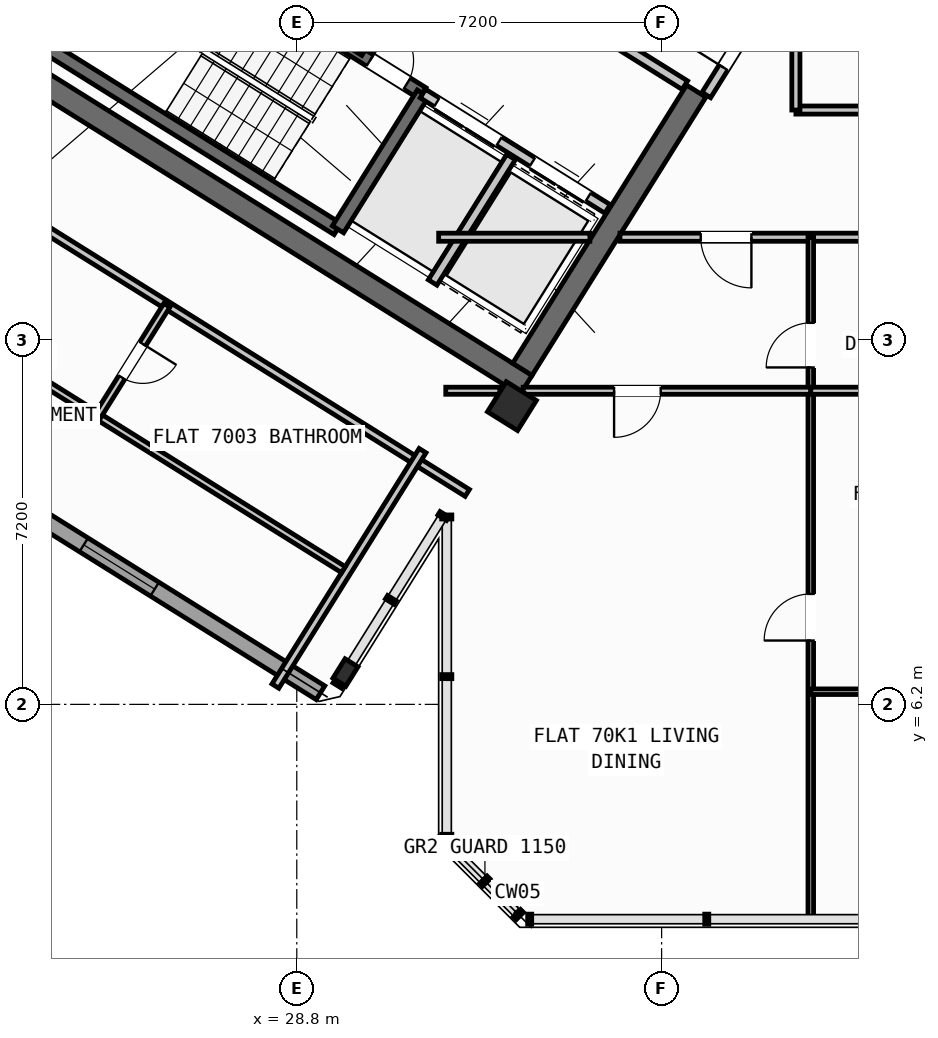
"""IFC4 building model, lengths in metres.
Left out: names, types, materials, properties, quantities, classifications, styles, units other than length and angle.
Written with IfcOpenShell. Run it as: python <this file> out.ifc"""

import sys

from ifc_helpers import new_model, si_unit, direction, frame, frame_2d, origin, origin_2d, place, context, subcontext, project, spatial, rectangle, hollow_rectangle, i_section, extrude, source, transform, mapped, element, fill, save


model = new_model("IFC4")
c1 = context("Model", 3, precision=1e-05, world=origin(), true_north=direction((0.0, 1.0)))
c2 = subcontext(c1, "Body", "Model", "MODEL_VIEW")
j1 = project(units=[si_unit("LENGTHUNIT", "METRE"), si_unit("PLANEANGLEUNIT", "RADIAN")], contexts=[c1])
p1 = place(None, origin())
s1 = spatial("IfcSite", under=j1, at=p1, CompositionType="ELEMENT")
p2 = place(p1, origin())
s2 = spatial("IfcBuilding", under=s1, at=p2, CompositionType="ELEMENT")
p3 = place(p2, frame((0.0, 0.0, 277.2)))
s3 = spatial("IfcBuildingStorey", under=s2, at=p3, CompositionType="ELEMENT", Elevation=277.2)
p4 = place(p3, frame((33.324, 12.503, 0.0), z_axis=(0.0, 0.0, 1.0), x_axis=(-0.848043529849, 0.529926571782, 0.0)))
e1 = element("IfcWall", 1, at=p4, inside=s3, PredefinedType="SHEAR", context=c2, shape_type="SweptSolid", body=[
    extrude(rectangle(XDim=13.04, YDim=0.45, at=frame_2d((6.52, 0.0))), origin(), (0.0, 0.0, 1.0), 3.35),
])
p5 = place(p3, frame((36.683, 18.304, 0.0), z_axis=(0.0, 0.0, 1.0), x_axis=(-0.529904039071, -0.848057609704, 0.0)))
e2 = element("IfcWall", 2, at=p5, inside=s3, PredefinedType="SHEAR", context=c2, shape_type="SweptSolid", body=[
    extrude(rectangle(XDim=6.475, YDim=0.45, at=frame_2d((3.238, 0.0))), origin(), (0.0, 0.0, 1.0), 3.35),
])
m1 = source(origin(), c2, "Body", "SweptSolid", [
    extrude(hollow_rectangle(XDim=0.7, YDim=0.7, WallThickness=0.028, at=origin_2d()), origin(), (0.0, 0.0, 1.0), 3.6),
])
p6 = place(p3, frame((33.046, 12.087, 0.0), z_axis=(0.0, 0.0, 1.0), x_axis=(-0.848048096156, 0.529919264233, 0.0)))
e3 = element("IfcColumn", 3, at=p6, inside=s3, PredefinedType="COLUMN", context=c2, shape_type="MappedRepresentation", body=[
    mapped(m1, transform((0.0, 0.0, 0.0), scale=1.0)),
])
m2 = source(origin(), c2, "Body", "SweptSolid", [
    extrude(i_section(OverallWidth=0.3, OverallDepth=0.45, WebThickness=0.014, FlangeThickness=0.026, at=origin_2d()), origin(), (0.0, 0.0, 1.0), 3.6),
])
p7 = place(p3, frame((29.761, 6.829, 0.0), z_axis=(0.0, 0.0, 1.0), x_axis=(-0.848048096156, 0.529919264233, 0.0)))
e4 = element("IfcColumn", 4, at=p7, inside=s3, PredefinedType="COLUMN", context=c2, shape_type="MappedRepresentation", body=[
    mapped(m2, transform((0.0, 0.0, 0.0), scale=1.0)),
])
p8 = place(p3, frame((29.268, 6.429, 0.0), z_axis=(0.0, 0.0, 1.0), x_axis=(-0.848049971435, 0.529916263149, 0.0)))
e5 = element("IfcWall", 5, at=p8, inside=s3, PredefinedType="STANDARD", context=c2, shape_type="SweptSolid", body=[
    extrude(rectangle(XDim=31.588, YDim=0.32, at=frame_2d((15.794, 0.0))), origin(), (0.0, 0.0, 1.0), 3.35),
])
p9 = place(p8, frame((16.362, 0.0, 0.0)))
e6 = element("IfcOpeningElement", 6, at=p9, cuts=e5, PredefinedType="OPENING", context=c2, shape_type="SweptSolid", body=[
    extrude(rectangle(XDim=1.2, YDim=2.15, at=frame_2d((0.6, 1.075))), frame((0.0, 0.17, 0.0), z_axis=(0.0, -1.0, 0.0), x_axis=(1.0, 0.0, 0.0)), (0.0, 0.0, 1.0), 0.34),
])
p10 = place(p8, frame((3.859, 0.0, 0.9)))
e7 = element("IfcOpeningElement", 7, at=p10, cuts=e5, PredefinedType="OPENING", context=c2, shape_type="SweptSolid", body=[
    extrude(rectangle(XDim=1.65, YDim=1.45, at=frame_2d((0.825, 0.725))), frame((0.0, 0.17, 0.0), z_axis=(0.0, -1.0, 0.0), x_axis=(1.0, 0.0, 0.0)), (0.0, 0.0, 1.0), 0.34),
])
p11 = place(p8, frame((10.519, 0.0, 0.9)))
e8 = element("IfcOpeningElement", 8, at=p11, cuts=e5, PredefinedType="OPENING", context=c2, shape_type="SweptSolid", body=[
    extrude(rectangle(XDim=1.65, YDim=1.45, at=frame_2d((0.825, 0.725))), frame((0.0, 0.17, 0.0), z_axis=(0.0, -1.0, 0.0), x_axis=(1.0, 0.0, 0.0)), (0.0, 0.0, 1.0), 0.34),
])
p12 = place(p8, frame((20.015, 0.0, 0.95)))
e9 = element("IfcOpeningElement", 9, at=p12, cuts=e5, PredefinedType="OPENING", context=c2, shape_type="SweptSolid", body=[
    extrude(rectangle(XDim=1.95, YDim=1.35, at=frame_2d((0.975, 0.675))), frame((0.0, 0.17, 0.0), z_axis=(0.0, -1.0, 0.0), x_axis=(1.0, 0.0, 0.0)), (0.0, 0.0, 1.0), 0.34),
])
p13 = place(p8, frame((23.715, 0.0, 1.0)))
e10 = element("IfcOpeningElement", 10, at=p13, cuts=e5, PredefinedType="OPENING", context=c2, shape_type="SweptSolid", body=[
    extrude(rectangle(XDim=0.9, YDim=1.25, at=frame_2d((0.45, 0.625))), frame((0.0, 0.17, 0.0), z_axis=(0.0, -1.0, 0.0), x_axis=(1.0, 0.0, 0.0)), (0.0, 0.0, 1.0), 0.34),
])
p14 = place(p8, frame((27.706, 0.0, 0.9)))
e11 = element("IfcOpeningElement", 11, at=p14, cuts=e5, PredefinedType="OPENING", context=c2, shape_type="SweptSolid", body=[
    extrude(rectangle(XDim=1.65, YDim=1.45, at=frame_2d((0.825, 0.725))), frame((0.0, 0.17, 0.0), z_axis=(0.0, -1.0, 0.0), x_axis=(1.0, 0.0, 0.0)), (0.0, 0.0, 1.0), 0.34),
])
p15 = place(p3, frame((29.605, 15.581, 0.0), z_axis=(0.0, 0.0, 1.0), x_axis=(-0.848036911448, 0.529937163087, 0.0)))
e12 = element("IfcWall", 12, at=p15, inside=s3, PredefinedType="SHEAR", context=c2, shape_type="SweptSolid", body=[
    extrude(rectangle(XDim=7.46, YDim=0.26, at=frame_2d((3.73, 0.0))), origin(), (0.0, 0.0, 1.0), 3.35),
])
p16 = place(p3, frame((31.28, 18.261, 0.0), z_axis=(0.0, 0.0, 1.0), x_axis=(-0.848051618787, 0.529913626805, 0.0)))
e13 = element("IfcWall", 13, at=p16, inside=s3, PredefinedType="SHEAR", context=c2, shape_type="SweptSolid", body=[
    extrude(rectangle(XDim=7.46, YDim=0.26, at=frame_2d((3.73, 0.0))), origin(), (0.0, 0.0, 1.0), 3.35),
])
p17 = place(p16, frame((0.36, 0.0, 0.0)))
e14 = element("IfcOpeningElement", 14, at=p17, cuts=e13, PredefinedType="OPENING", context=c2, shape_type="SweptSolid", body=[
    extrude(rectangle(XDim=0.86, YDim=2.05, at=frame_2d((0.43, 1.025))), frame((0.0, 0.14, 0.0), z_axis=(0.0, -1.0, 0.0), x_axis=(1.0, 0.0, 0.0)), (0.0, 0.0, 1.0), 0.28),
])
p18 = place(p3, frame((31.288, 18.256, 0.0), z_axis=(0.0, 0.0, 1.0), x_axis=(-0.529943379326, -0.848033026897, 0.0)))
e15 = element("IfcWall", 15, at=p18, inside=s3, PredefinedType="SHEAR", context=c2, shape_type="SweptSolid", body=[
    extrude(rectangle(XDim=3.16, YDim=0.26, at=frame_2d((1.58, 0.0))), origin(), (0.0, 0.0, 1.0), 3.35),
])
p19 = place(p3, frame((34.933, 15.978, 0.0), z_axis=(0.0, 0.0, 1.0), x_axis=(-0.848055739377, 0.529907032327, 0.0)))
e16 = element("IfcWall", 16, at=p19, inside=s3, PredefinedType="STANDARD", context=c2, shape_type="SweptSolid", body=[
    extrude(rectangle(XDim=4.298, YDim=0.2, at=frame_2d((2.149, 0.0))), origin(), (0.0, 0.0, 1.0), 3.34),
])
p20 = place(p19, frame((0.448, 0.0, 0.0)))
e17 = element("IfcOpeningElement", 17, at=p20, cuts=e16, PredefinedType="OPENING", context=c2, shape_type="SweptSolid", body=[
    extrude(rectangle(XDim=1.3, YDim=2.2, at=frame_2d((0.65, 1.1))), frame((0.0, 0.11, 0.0), z_axis=(0.0, -1.0, 0.0), x_axis=(1.0, 0.0, 0.0)), (0.0, 0.0, 1.0), 0.22),
])
p21 = place(p19, frame((2.523, 0.0, 0.0)))
e18 = element("IfcOpeningElement", 18, at=p21, cuts=e16, PredefinedType="OPENING", context=c2, shape_type="SweptSolid", body=[
    extrude(rectangle(XDim=1.45, YDim=2.25, at=frame_2d((0.725, 1.125))), frame((0.0, 0.11, 0.0), z_axis=(0.0, -1.0, 0.0), x_axis=(1.0, 0.0, 0.0)), (0.0, 0.0, 1.0), 0.22),
])
p22 = place(p3, frame((36.459, 18.421, 0.0), z_axis=(0.0, 0.0, 1.0), x_axis=(-0.848059591691, 0.529900867089, 0.0)))
e19 = element("IfcWall", 19, at=p22, inside=s3, PredefinedType="STANDARD", context=c2, shape_type="SweptSolid", body=[
    extrude(rectangle(XDim=5.818, YDim=0.2, at=frame_2d((2.909, 0.0))), origin(), (0.0, 0.0, 1.0), 3.34),
])
p23 = place(p22, frame((2.598, 0.0, 0.0)))
e20 = element("IfcOpeningElement", 20, at=p23, cuts=e19, PredefinedType="OPENING", context=c2, shape_type="SweptSolid", body=[
    extrude(rectangle(XDim=1.15, YDim=2.1, at=frame_2d((0.575, 1.05))), frame((0.0, 0.11, 0.0), z_axis=(0.0, -1.0, 0.0), x_axis=(1.0, 0.0, 0.0)), (0.0, 0.0, 1.0), 0.22),
])
p24 = place(p3, frame((33.029, 17.003, 0.0), z_axis=(0.0, 0.0, 1.0), x_axis=(-0.529916267533, -0.848049968695, 0.0)))
e21 = element("IfcWall", 21, at=p24, inside=s3, PredefinedType="STANDARD", context=c2, shape_type="SweptSolid", body=[
    extrude(rectangle(XDim=2.92, YDim=0.2, at=frame_2d((1.46, 0.0))), origin(), (0.0, 0.0, 1.0), 3.34),
])
p25 = place(p3, frame((31.525, 21.504, 0.0), z_axis=(0.0, 0.0, 1.0), x_axis=(-0.529907497854, -0.848055448493, 0.0)))
e22 = element("IfcWall", 22, at=p25, inside=s3, PredefinedType="STANDARD", context=c2, shape_type="SweptSolid", body=[
    extrude(rectangle(XDim=2.88, YDim=0.2, at=frame_2d((1.44, 0.0))), origin(), (0.0, 0.0, 1.0), 3.34),
])
p26 = place(p3, frame((24.588, 27.631, 0.0), z_axis=(0.0, 0.0, 1.0), x_axis=(-0.529914586043, -0.848051019396, 0.0)))
e23 = element("IfcWall", 23, at=p26, inside=s3, PredefinedType="PARTITIONING", context=c2, shape_type="SweptSolid", body=[
    extrude(rectangle(XDim=15.35, YDim=0.16, at=frame_2d((7.675, 0.0))), origin(), (0.0, 0.0, 1.0), 3.34),
])
p27 = place(p3, frame((32.164, 10.374, 0.0), z_axis=(0.0, 0.0, 1.0), x_axis=(-0.848044107957, 0.529925646633, 0.0)))
e24 = element("IfcWall", 24, at=p27, inside=s3, PredefinedType="PARTITIONING", context=c2, shape_type="SweptSolid", body=[
    extrude(rectangle(XDim=15.57, YDim=0.16, at=frame_2d((7.785, 0.0))), origin(), (0.0, 0.0, 1.0), 3.34),
])
p28 = place(p27, frame((10.83, 0.0, 0.0)))
e25 = element("IfcOpeningElement", 25, at=p28, cuts=e24, PredefinedType="OPENING", context=c2, shape_type="SweptSolid", body=[
    extrude(rectangle(XDim=1.0, YDim=2.1, at=frame_2d((0.5, 1.05))), frame((0.0, 0.09, 0.0), z_axis=(0.0, -1.0, 0.0), x_axis=(1.0, 0.0, 0.0)), (0.0, 0.0, 1.0), 0.18),
])
p29 = place(p3, frame((31.282, 11.208, 0.0), z_axis=(0.0, 0.0, 1.0), x_axis=(-0.529938869374, -0.84803584519, 0.0)))
e26 = element("IfcWall", 26, at=p29, inside=s3, PredefinedType="PARTITIONING", context=c2, shape_type="SweptSolid", body=[
    extrude(rectangle(XDim=5.48, YDim=0.16, at=frame_2d((2.74, 0.0))), origin(), (0.0, 0.0, 1.0), 3.34),
])
p30 = place(p3, frame((29.72, 8.859, 0.0), z_axis=(0.0, 0.0, 1.0), x_axis=(-0.848049134363, 0.529917602752, 0.0)))
e27 = element("IfcWall", 27, at=p30, inside=s3, PredefinedType="PLUMBINGWALL", context=c2, shape_type="SweptSolid", body=[
    extrude(rectangle(XDim=14.3, YDim=0.14, at=frame_2d((7.15, 0.0))), origin(), (0.0, 0.0, 1.0), 3.34),
])
p31 = place(p30, frame((9.57, 0.0, 0.0)))
e28 = element("IfcOpeningElement", 28, at=p31, cuts=e27, PredefinedType="OPENING", context=c2, shape_type="SweptSolid", body=[
    extrude(rectangle(XDim=0.92, YDim=2.08, at=frame_2d((0.46, 1.04))), frame((0.0, 0.08, 0.0), z_axis=(0.0, -1.0, 0.0), x_axis=(1.0, 0.0, 0.0)), (0.0, 0.0, 1.0), 0.16),
])
p32 = place(p3, frame((26.237, 14.078, 0.0), z_axis=(0.0, 0.0, 1.0), x_axis=(-0.52995640672, -0.848024885824, 0.0)))
e29 = element("IfcWall", 29, at=p32, inside=s3, PredefinedType="PLUMBINGWALL", context=c2, shape_type="SweptSolid", body=[
    extrude(rectangle(XDim=2.58, YDim=0.14, at=frame_2d((1.29, 0.0))), origin(), (0.0, 0.0, 1.0), 3.34),
])
p33 = place(p32, frame((0.9, 0.0, 0.0)))
e30 = element("IfcOpeningElement", 30, at=p33, cuts=e29, PredefinedType="OPENING", context=c2, shape_type="SweptSolid", body=[
    extrude(rectangle(XDim=0.78, YDim=2.05, at=frame_2d((0.39, 1.025))), frame((0.0, 0.08, 0.0), z_axis=(0.0, -1.0, 0.0), x_axis=(1.0, 0.0, 0.0)), (0.0, 0.0, 1.0), 0.16),
])
p34 = place(p3, frame((38.451, 20.737, 0.0), z_axis=(0.0, 0.0, 1.0), x_axis=(-0.529924799939, -0.848044637038, 0.0)))
e31 = element("IfcWall", 31, at=p34, inside=s3, PredefinedType="STANDARD", context=c2, shape_type="SweptSolid", body=[
    extrude(rectangle(XDim=2.96, YDim=0.2, at=frame_2d((1.48, 0.0))), origin(), (0.0, 0.0, 1.0), 3.34),
])
p35 = place(p34, frame((1.46, 0.0, 0.0)))
e32 = element("IfcOpeningElement", 32, at=p35, cuts=e31, PredefinedType="OPENING", context=c2, shape_type="SweptSolid", body=[
    extrude(rectangle(XDim=0.86, YDim=2.05, at=frame_2d((0.43, 1.025))), frame((0.0, 0.11, 0.0), z_axis=(0.0, -1.0, 0.0), x_axis=(1.0, 0.0, 0.0)), (0.0, 0.0, 1.0), 0.22),
])
p36 = place(p3, frame((31.6, 15.42, 0.0), z_axis=(0.0, 0.0, 1.0), x_axis=(1.0, 0.0, 0.0)))
e33 = element("IfcWall", 33, at=p36, inside=s3, PredefinedType="PARTITIONING", context=c2, shape_type="SweptSolid", body=[
    extrude(rectangle(XDim=2.984, YDim=0.16, at=frame_2d((1.492, 0.0))), origin(), (0.0, 0.0, 1.0), 3.34),
])
p37 = place(p3, frame((35.178, 15.42, 0.0), z_axis=(0.0, 0.0, 1.0), x_axis=(1.0, 0.0, 0.0)))
e34 = element("IfcWall", 34, at=p37, inside=s3, PredefinedType="PARTITIONING", context=c2, shape_type="SweptSolid", body=[
    extrude(rectangle(XDim=9.021, YDim=0.16, at=frame_2d((4.511, 0.0))), origin(), (0.0, 0.0, 1.0), 3.34),
])
p38 = place(p37, frame((1.594, 0.0, 0.0)))
e35 = element("IfcOpeningElement", 35, at=p38, cuts=e34, PredefinedType="OPENING", context=c2, shape_type="SweptSolid", body=[
    extrude(rectangle(XDim=1.0, YDim=2.1, at=frame_2d((0.5, 1.05))), frame((0.0, 0.09, 0.0), z_axis=(0.0, -1.0, 0.0), x_axis=(1.0, 0.0, 0.0)), (0.0, 0.0, 1.0), 0.18),
])
p39 = place(p3, frame((38.65, 17.93, 0.0), z_axis=(0.0, 0.0, 1.0), x_axis=(1.0, 0.0, 0.0)))
e36 = element("IfcWall", 36, at=p39, inside=s3, PredefinedType="PARTITIONING", context=c2, shape_type="SweptSolid", body=[
    extrude(rectangle(XDim=4.15, YDim=0.16, at=frame_2d((2.075, 0.0))), origin(), (0.0, 0.0, 1.0), 3.34),
])
p40 = place(p39, frame((1.575, 0.0, 0.0)))
e37 = element("IfcOpeningElement", 37, at=p40, cuts=e36, PredefinedType="OPENING", context=c2, shape_type="SweptSolid", body=[
    extrude(rectangle(XDim=1.0, YDim=2.1, at=frame_2d((0.5, 1.05))), frame((0.0, 0.09, 0.0), z_axis=(0.0, -1.0, 0.0), x_axis=(1.0, 0.0, 0.0)), (0.0, 0.0, 1.0), 0.18),
])
p41 = place(p3, frame((38.65, 17.93, 0.0), z_axis=(0.0, 0.0, 1.0), x_axis=(0.0, 1.0, 0.0)))
e38 = element("IfcWall", 38, at=p41, inside=s3, PredefinedType="PARTITIONING", context=c2, shape_type="SweptSolid", body=[
    extrude(rectangle(XDim=3.046, YDim=0.16, at=frame_2d((1.523, 0.0))), origin(), (0.0, 0.0, 1.0), 3.34),
])
p42 = place(p3, frame((38.944, 1.96, 0.0), z_axis=(0.0, 0.0, 1.0), x_axis=(0.0, 1.0, 0.0)))
e39 = element("IfcWall", 39, at=p42, inside=s3, PredefinedType="PARTITIONING", context=c2, shape_type="SweptSolid", body=[
    extrude(rectangle(XDim=13.46, YDim=0.11, at=frame_2d((6.73, 0.0))), origin(), (0.0, 0.0, 1.0), 3.34),
])
p43 = place(p42, frame((5.5, 0.0, 0.0)))
e40 = element("IfcOpeningElement", 40, at=p43, cuts=e39, PredefinedType="OPENING", context=c2, shape_type="SweptSolid", body=[
    extrude(rectangle(XDim=0.92, YDim=2.08, at=frame_2d((0.46, 1.04))), frame((0.0, 0.065, 0.0), z_axis=(0.0, -1.0, 0.0), x_axis=(1.0, 0.0, 0.0)), (0.0, 0.0, 1.0), 0.13),
])
p44 = place(p42, frame((10.89, 0.0, 0.0)))
e41 = element("IfcOpeningElement", 41, at=p44, cuts=e39, PredefinedType="OPENING", context=c2, shape_type="SweptSolid", body=[
    extrude(rectangle(XDim=0.88, YDim=2.08, at=frame_2d((0.44, 1.04))), frame((0.0, 0.065, 0.0), z_axis=(0.0, -1.0, 0.0), x_axis=(1.0, 0.0, 0.0)), (0.0, 0.0, 1.0), 0.13),
])
p45 = place(p3, frame((31.74, 12.39, 0.0), z_axis=(0.0, 0.0, 1.0), x_axis=(1.0, 0.0, 0.0)))
e42 = element("IfcWall", 42, at=p45, inside=s3, PredefinedType="PLUMBINGWALL", context=c2, shape_type="SweptSolid", body=[
    extrude(rectangle(XDim=1.069, YDim=0.14, at=frame_2d((0.534, 0.0))), origin(), (0.0, 0.0, 1.0), 3.34),
])
p46 = place(p3, frame((33.267, 12.39, 0.0), z_axis=(0.0, 0.0, 1.0), x_axis=(1.0, 0.0, 0.0)))
e43 = element("IfcWall", 43, at=p46, inside=s3, PredefinedType="PLUMBINGWALL", context=c2, shape_type="SweptSolid", body=[
    extrude(rectangle(XDim=5.677, YDim=0.14, at=frame_2d((2.838, 0.0))), origin(), (0.0, 0.0, 1.0), 3.34),
])
p47 = place(p46, frame((1.795, 0.0, 0.0)))
e44 = element("IfcOpeningElement", 44, at=p47, cuts=e43, PredefinedType="OPENING", context=c2, shape_type="SweptSolid", body=[
    extrude(rectangle(XDim=0.92, YDim=2.08, at=frame_2d((0.46, 1.04))), frame((0.0, 0.08, 0.0), z_axis=(0.0, -1.0, 0.0), x_axis=(1.0, 0.0, 0.0)), (0.0, 0.0, 1.0), 0.16),
])
p48 = place(p3, frame((38.944, 12.39, 0.0), z_axis=(0.0, 0.0, 1.0), x_axis=(1.0, 0.0, 0.0)))
e45 = element("IfcWall", 45, at=p48, inside=s3, PredefinedType="PLUMBINGWALL", context=c2, shape_type="SweptSolid", body=[
    extrude(rectangle(XDim=5.116, YDim=0.14, at=frame_2d((2.558, 0.0))), origin(), (0.0, 0.0, 1.0), 3.34),
])
p49 = place(p3, frame((38.944, 6.45, 0.0), z_axis=(0.0, 0.0, 1.0), x_axis=(1.0, 0.0, 0.0)))
e46 = element("IfcWall", 46, at=p49, inside=s3, PredefinedType="PARTITIONING", context=c2, shape_type="SweptSolid", body=[
    extrude(rectangle(XDim=5.116, YDim=0.11, at=frame_2d((2.558, 0.0))), origin(), (0.0, 0.0, 1.0), 3.34),
])
p50 = place(p49, frame((2.018, 0.0, 0.0)))
e47 = element("IfcOpeningElement", 47, at=p50, cuts=e46, PredefinedType="OPENING", context=c2, shape_type="SweptSolid", body=[
    extrude(rectangle(XDim=0.92, YDim=2.08, at=frame_2d((0.46, 1.04))), frame((0.0, 0.065, 0.0), z_axis=(0.0, -1.0, 0.0), x_axis=(1.0, 0.0, 0.0)), (0.0, 0.0, 1.0), 0.13),
])
m3 = source(origin(), c2, "Body", "SweptSolid", [
    extrude(rectangle(XDim=1.65, YDim=1.45, at=frame_2d((0.825, 0.725))), frame((0.0, 0.03, 0.0), z_axis=(0.0, -1.0, 0.0), x_axis=(1.0, 0.0, 0.0)), (0.0, 0.0, 1.0), 0.06),
])
p51 = place(p10, origin())
e48 = element("IfcWindow", 48, at=p51, inside=s3, PartitioningType="SINGLE_PANEL", PredefinedType="WINDOW", context=c2, shape_type="MappedRepresentation", body=[
    mapped(m3, transform((0.0, 0.0, 0.0), scale=1.0)),
])
fill(e7, e48)
m4 = source(origin(), c2, "Body", "SweptSolid", [
    extrude(rectangle(XDim=0.86, YDim=2.05, at=frame_2d((0.43, 1.025))), frame((0.0, 0.025, 0.0), z_axis=(0.0, -1.0, 0.0), x_axis=(1.0, 0.0, 0.0)), (0.0, 0.0, 1.0), 0.05),
])
p52 = place(p17, frame((0.86, 0.0, 0.0), z_axis=(0.0, 0.0, 1.0), x_axis=(-1.0, 0.0, 0.0)))
e49 = element("IfcDoor", 49, at=p52, inside=s3, OperationType="SINGLE_SWING_LEFT", PredefinedType="DOOR", context=c2, shape_type="MappedRepresentation", body=[
    mapped(m4, transform((0.0, 0.0, 0.0), scale=1.0)),
])
fill(e14, e49)
m5 = source(origin(), c2, "Body", "SweptSolid", [
    extrude(rectangle(XDim=1.3, YDim=2.2, at=frame_2d((0.65, 1.1))), frame((0.0, 0.025, 0.0), z_axis=(0.0, -1.0, 0.0), x_axis=(1.0, 0.0, 0.0)), (0.0, 0.0, 1.0), 0.05),
])
p53 = place(p20, origin())
e50 = element("IfcDoor", 50, at=p53, inside=s3, OperationType="DOUBLE_DOOR_SLIDING", PredefinedType="DOOR", context=c2, shape_type="MappedRepresentation", body=[
    mapped(m5, transform((0.0, 0.0, 0.0), scale=1.0)),
])
fill(e17, e50)
m6 = source(origin(), c2, "Body", "SweptSolid", [
    extrude(rectangle(XDim=1.45, YDim=2.25, at=frame_2d((0.725, 1.125))), frame((0.0, 0.025, 0.0), z_axis=(0.0, -1.0, 0.0), x_axis=(1.0, 0.0, 0.0)), (0.0, 0.0, 1.0), 0.05),
])
p54 = place(p21, origin())
e51 = element("IfcDoor", 51, at=p54, inside=s3, OperationType="DOUBLE_DOOR_SLIDING", PredefinedType="DOOR", context=c2, shape_type="MappedRepresentation", body=[
    mapped(m6, transform((0.0, 0.0, 0.0), scale=1.0)),
])
fill(e18, e51)
m7 = source(origin(), c2, "Body", "SweptSolid", [
    extrude(rectangle(XDim=0.78, YDim=2.05, at=frame_2d((0.39, 1.025))), frame((0.0, 0.025, 0.0), z_axis=(0.0, -1.0, 0.0), x_axis=(1.0, 0.0, 0.0)), (0.0, 0.0, 1.0), 0.05),
])
p55 = place(p33, origin())
e52 = element("IfcDoor", 52, at=p55, inside=s3, OperationType="SINGLE_SWING_LEFT", PredefinedType="DOOR", context=c2, shape_type="MappedRepresentation", body=[
    mapped(m7, transform((0.0, 0.0, 0.0), scale=1.0)),
])
fill(e30, e52)
p56 = place(p35, frame((0.86, 0.0, 0.0), z_axis=(0.0, 0.0, 1.0), x_axis=(-1.0, 0.0, 0.0)))
e53 = element("IfcDoor", 53, at=p56, inside=s3, OperationType="SINGLE_SWING_LEFT", PredefinedType="DOOR", context=c2, shape_type="MappedRepresentation", body=[
    mapped(m4, transform((0.0, 0.0, 0.0), scale=1.0)),
])
fill(e32, e53)
m8 = source(origin(), c2, "Body", "SweptSolid", [
    extrude(rectangle(XDim=0.92, YDim=2.08, at=frame_2d((0.46, 1.04))), frame((0.0, 0.025, 0.0), z_axis=(0.0, -1.0, 0.0), x_axis=(1.0, 0.0, 0.0)), (0.0, 0.0, 1.0), 0.05),
])
p57 = place(p43, origin())
e54 = element("IfcDoor", 54, at=p57, inside=s3, OperationType="SINGLE_SWING_LEFT", PredefinedType="DOOR", context=c2, shape_type="MappedRepresentation", body=[
    mapped(m8, transform((0.0, 0.0, 0.0), scale=1.0)),
])
fill(e40, e54)
m9 = source(origin(), c2, "Body", "SweptSolid", [
    extrude(rectangle(XDim=1.0, YDim=2.1, at=frame_2d((0.5, 1.05))), frame((0.0, 0.025, 0.0), z_axis=(0.0, -1.0, 0.0), x_axis=(1.0, 0.0, 0.0)), (0.0, 0.0, 1.0), 0.05),
])
p58 = place(p38, frame((1.0, 0.0, 0.0), z_axis=(0.0, 0.0, 1.0), x_axis=(-1.0, 0.0, 0.0)))
e55 = element("IfcDoor", 55, at=p58, inside=s3, OperationType="SINGLE_SWING_LEFT", PredefinedType="DOOR", context=c2, shape_type="MappedRepresentation", body=[
    mapped(m9, transform((0.0, 0.0, 0.0), scale=1.0)),
])
fill(e35, e55)
p59 = place(p47, frame((0.92, 0.0, 0.0), z_axis=(0.0, 0.0, 1.0), x_axis=(-1.0, 0.0, 0.0)))
e56 = element("IfcDoor", 56, at=p59, inside=s3, OperationType="SINGLE_SWING_RIGHT", PredefinedType="DOOR", context=c2, shape_type="MappedRepresentation", body=[
    mapped(m8, transform((0.0, 0.0, 0.0), scale=1.0)),
])
fill(e44, e56)
m10 = source(origin(), c2, "Body", "SweptSolid", [
    extrude(rectangle(XDim=0.88, YDim=2.08, at=frame_2d((0.44, 1.04))), frame((0.0, 0.025, 0.0), z_axis=(0.0, -1.0, 0.0), x_axis=(1.0, 0.0, 0.0)), (0.0, 0.0, 1.0), 0.05),
])
p60 = place(p44, origin())
e57 = element("IfcDoor", 57, at=p60, inside=s3, OperationType="SINGLE_SWING_LEFT", PredefinedType="DOOR", context=c2, shape_type="MappedRepresentation", body=[
    mapped(m10, transform((0.0, 0.0, 0.0), scale=1.0)),
])
fill(e41, e57)
save(model, sys.argv[1])
